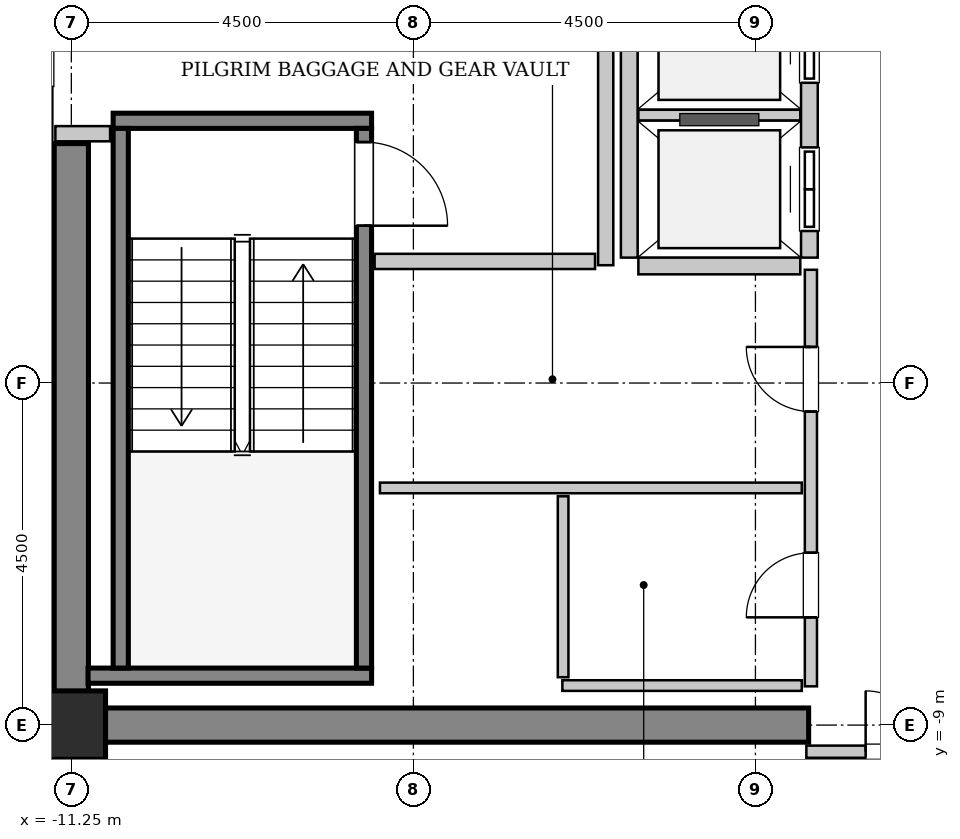
"""IFC4 building model, lengths in metres.
Left out: names, types, materials, properties, quantities, classifications, styles, units other than length and angle.
Written with IfcOpenShell. Run it as: python <this file> out.ifc"""

import sys

from ifc_helpers import new_model, si_unit, direction, frame, frame_2d, origin, origin_2d, place, context, subcontext, project, spatial, rectangle, extrude, source, transform, mapped, element, fill, save


model = new_model("IFC4")
c1 = context("Model", 3, precision=1e-05, world=origin(), true_north=direction((0.0, 1.0)))
c2 = subcontext(c1, "Body", "Model", "MODEL_VIEW")
j1 = project(units=[si_unit("LENGTHUNIT", "METRE"), si_unit("PLANEANGLEUNIT", "RADIAN")], contexts=[c1])
p1 = place(None, origin())
s1 = spatial("IfcSite", under=j1, at=p1, CompositionType="ELEMENT")
p2 = place(p1, origin())
s2 = spatial("IfcBuilding", under=s1, at=p2, CompositionType="ELEMENT")
p3 = place(p2, frame((0.0, 0.0, 302.6)))
s3 = spatial("IfcBuildingStorey", under=s2, at=p3, CompositionType="ELEMENT", Elevation=302.6)
m1 = source(origin(), c2, "Body", "SweptSolid", [
    extrude(rectangle(XDim=9.925, YDim=0.45, at=frame_2d((4.962, 0.0))), origin(), (0.0, 0.0, 1.0), 3.8),
])
p4 = place(p3, frame((-11.475, -9.0, 0.0), z_axis=(0.0, 0.0, 1.0), x_axis=(1.0, 0.0, 0.0)))
e1 = element("IfcWall", 1, at=p4, inside=s3, PredefinedType="SHEAR", context=c2, shape_type="MappedRepresentation", body=[
    mapped(m1, transform((0.0, 0.0, 0.0), x_axis=(1.0, 0.0, 0.0), y_axis=(0.0, 1.0, 0.0), z_axis=(0.0, 0.0, 1.0), scale=1.0)),
])
m2 = source(origin(), c2, "Body", "SweptSolid", [
    extrude(rectangle(XDim=7.425, YDim=0.45, at=frame_2d((3.712, 0.0))), origin(), (0.0, 0.0, 1.0), 3.8),
])
p5 = place(p3, frame((-11.25, -8.775, 0.0), z_axis=(0.0, 0.0, 1.0), x_axis=(0.0, 1.0, 0.0)))
e2 = element("IfcWall", 2, at=p5, inside=s3, PredefinedType="SHEAR", context=c2, shape_type="MappedRepresentation", body=[
    mapped(m2, transform((0.0, 0.0, 0.0), x_axis=(1.0, 0.0, 0.0), y_axis=(0.0, 1.0, 0.0), z_axis=(0.0, 0.0, 1.0), scale=1.0)),
])
m3 = source(origin(), c2, "Body", "SweptSolid", [
    extrude(rectangle(XDim=0.9, YDim=0.9, at=origin_2d()), origin(), (0.0, 0.0, 1.0), 3.8),
])
p6 = place(p3, frame((-11.25, -9.0, 0.0), z_axis=(0.0, 0.0, 1.0), x_axis=(1.0, 0.0, 0.0)))
e3 = element("IfcColumn", 3, at=p6, inside=s3, PredefinedType="COLUMN", context=c2, shape_type="MappedRepresentation", body=[
    mapped(m3, transform((0.0, 0.0, 0.0), x_axis=(1.0, 0.0, 0.0), y_axis=(0.0, 1.0, 0.0), z_axis=(0.0, 0.0, 1.0), scale=1.0)),
])
m4 = source(origin(), c2, "Body", "SweptSolid", [
    extrude(rectangle(XDim=3.4, YDim=0.2, at=frame_2d((1.7, 0.0))), origin(), (0.0, 0.0, 1.0), 3.8),
])
p7 = place(p3, frame((-10.7, -1.05, 0.0), z_axis=(0.0, 0.0, 1.0), x_axis=(1.0, 0.0, 0.0)))
e4 = element("IfcWall", 4, at=p7, inside=s3, PredefinedType="SOLIDWALL", context=c2, shape_type="MappedRepresentation", body=[
    mapped(m4, transform((0.0, 0.0, 0.0), x_axis=(1.0, 0.0, 0.0), y_axis=(0.0, 1.0, 0.0), z_axis=(0.0, 0.0, 1.0), scale=1.0)),
])
m5 = source(origin(), c2, "Body", "SweptSolid", [
    extrude(rectangle(XDim=3.73, YDim=0.2, at=frame_2d((1.865, 0.0))), origin(), (0.0, 0.0, 1.0), 3.8),
])
p8 = place(p3, frame((-11.03, -8.35, 0.0), z_axis=(0.0, 0.0, 1.0), x_axis=(1.0, 0.0, 0.0)))
e5 = element("IfcWall", 5, at=p8, inside=s3, PredefinedType="SOLIDWALL", context=c2, shape_type="MappedRepresentation", body=[
    mapped(m5, transform((0.0, 0.0, 0.0), x_axis=(1.0, 0.0, 0.0), y_axis=(0.0, 1.0, 0.0), z_axis=(0.0, 0.0, 1.0), scale=1.0)),
])
m6 = source(origin(), c2, "Body", "SweptSolid", [
    extrude(rectangle(XDim=7.1, YDim=0.2, at=frame_2d((3.55, 0.0))), origin(), (0.0, 0.0, 1.0), 3.8),
])
p9 = place(p3, frame((-10.6, -1.15, 0.0), z_axis=(0.0, 0.0, 1.0), x_axis=(0.0, -1.0, 0.0)))
e6 = element("IfcWall", 6, at=p9, inside=s3, PredefinedType="SOLIDWALL", context=c2, shape_type="MappedRepresentation", body=[
    mapped(m6, transform((0.0, 0.0, 0.0), x_axis=(1.0, 0.0, 0.0), y_axis=(0.0, 1.0, 0.0), z_axis=(0.0, 0.0, 1.0), scale=1.0)),
])
p10 = place(p3, frame((-7.4, -1.15, 0.0), z_axis=(0.0, 0.0, 1.0), x_axis=(0.0, -1.0, 0.0)))
e7 = element("IfcWall", 7, at=p10, inside=s3, PredefinedType="SOLIDWALL", context=c2, shape_type="MappedRepresentation", body=[
    mapped(m6, transform((0.0, 0.0, 0.0), x_axis=(1.0, 0.0, 0.0), y_axis=(0.0, 1.0, 0.0), z_axis=(0.0, 0.0, 1.0), scale=1.0)),
])
p11 = place(p10, frame((0.18, 0.0, 0.0)))
e8 = element("IfcOpeningElement", 8, at=p11, cuts=e7, PredefinedType="OPENING", context=c2, shape_type="SweptSolid", body=[
    extrude(rectangle(XDim=1.1, YDim=2.15, at=frame_2d((0.55, 1.075))), frame((0.0, 0.11, 0.0), z_axis=(0.0, -1.0, 0.0), x_axis=(1.0, 0.0, 0.0)), (0.0, 0.0, 1.0), 0.22),
])
m7 = source(origin(), c2, "Body", "SweptSolid", [
    extrude(rectangle(XDim=5.7, YDim=0.22, at=frame_2d((2.85, 0.0))), origin(), (0.0, 0.0, 1.0), 3.535),
])
p12 = place(p3, frame((-1.54, -2.85, 0.0), z_axis=(0.0, 0.0, 1.0), x_axis=(0.0, 1.0, 0.0)))
e9 = element("IfcWall", 9, at=p12, inside=s3, PredefinedType="SOLIDWALL", context=c2, shape_type="MappedRepresentation", body=[
    mapped(m7, transform((0.0, 0.0, 0.0), x_axis=(1.0, 0.0, 0.0), y_axis=(0.0, 1.0, 0.0), z_axis=(0.0, 0.0, 1.0), scale=1.0)),
])
p13 = place(p12, frame((0.35, 0.0, 0.0)))
e10 = element("IfcOpeningElement", 10, at=p13, cuts=e9, PredefinedType="OPENING", context=c2, shape_type="SweptSolid", body=[
    extrude(rectangle(XDim=1.1, YDim=2.2, at=frame_2d((0.55, 1.1))), frame((0.0, 0.12, 0.0), z_axis=(0.0, -1.0, 0.0), x_axis=(1.0, 0.0, 0.0)), (0.0, 0.0, 1.0), 0.24),
])
p14 = place(p12, frame((2.3, 0.0, 0.0)))
e11 = element("IfcOpeningElement", 11, at=p14, cuts=e9, PredefinedType="OPENING", context=c2, shape_type="SweptSolid", body=[
    extrude(rectangle(XDim=1.1, YDim=2.2, at=frame_2d((0.55, 1.1))), frame((0.0, 0.12, 0.0), z_axis=(0.0, -1.0, 0.0), x_axis=(1.0, 0.0, 0.0)), (0.0, 0.0, 1.0), 0.24),
])
p15 = place(p12, frame((4.25, 0.0, 0.0)))
e12 = element("IfcOpeningElement", 12, at=p15, cuts=e9, PredefinedType="OPENING", context=c2, shape_type="SweptSolid", body=[
    extrude(rectangle(XDim=1.1, YDim=2.2, at=frame_2d((0.55, 1.1))), frame((0.0, 0.12, 0.0), z_axis=(0.0, -1.0, 0.0), x_axis=(1.0, 0.0, 0.0)), (0.0, 0.0, 1.0), 0.24),
])
p16 = place(p3, frame((-3.91, 2.85, 0.0), z_axis=(0.0, 0.0, 1.0), x_axis=(0.0, -1.0, 0.0)))
e13 = element("IfcWall", 13, at=p16, inside=s3, PredefinedType="SOLIDWALL", context=c2, shape_type="MappedRepresentation", body=[
    mapped(m7, transform((0.0, 0.0, 0.0), x_axis=(1.0, 0.0, 0.0), y_axis=(0.0, 1.0, 0.0), z_axis=(0.0, 0.0, 1.0), scale=1.0)),
])
m8 = source(origin(), c2, "Body", "SweptSolid", [
    extrude(rectangle(XDim=2.13, YDim=0.22, at=frame_2d((1.065, 0.0))), origin(), (0.0, 0.0, 1.0), 3.535),
])
p17 = place(p3, frame((-3.79, -2.96, 0.0), z_axis=(0.0, 0.0, 1.0), x_axis=(1.0, 0.0, 0.0)))
e14 = element("IfcWall", 14, at=p17, inside=s3, PredefinedType="SOLIDWALL", context=c2, shape_type="MappedRepresentation", body=[
    mapped(m8, transform((0.0, 0.0, 0.0), x_axis=(1.0, 0.0, 0.0), y_axis=(0.0, 1.0, 0.0), z_axis=(0.0, 0.0, 1.0), scale=1.0)),
])
m9 = source(origin(), c2, "Body", "SweptSolid", [
    extrude(rectangle(XDim=2.13, YDim=0.14, at=frame_2d((1.065, 0.0))), origin(), (0.0, 0.0, 1.0), 3.535),
])
p18 = place(p3, frame((-3.79, -0.975, 0.0), z_axis=(0.0, 0.0, 1.0), x_axis=(1.0, 0.0, 0.0)))
e15 = element("IfcWall", 15, at=p18, inside=s3, PredefinedType="PARTITIONING", context=c2, shape_type="MappedRepresentation", body=[
    mapped(m9, transform((0.0, 0.0, 0.0), x_axis=(1.0, 0.0, 0.0), y_axis=(0.0, 1.0, 0.0), z_axis=(0.0, 0.0, 1.0), scale=1.0)),
])
m10 = source(origin(), c2, "Body", "SweptSolid", [
    extrude(rectangle(XDim=5.9, YDim=0.2, at=frame_2d((2.95, 0.0))), origin(), (0.0, 0.0, 1.0), 3.535),
])
p19 = place(p3, frame((-4.22, -2.95, 0.0), z_axis=(0.0, 0.0, 1.0), x_axis=(0.0, 1.0, 0.0)))
e16 = element("IfcWall", 16, at=p19, inside=s3, PredefinedType="PARTITIONING", context=c2, shape_type="MappedRepresentation", body=[
    mapped(m10, transform((0.0, 0.0, 0.0), x_axis=(1.0, 0.0, 0.0), y_axis=(0.0, 1.0, 0.0), z_axis=(0.0, 0.0, 1.0), scale=1.0)),
])
m11 = source(origin(), c2, "Body", "SweptSolid", [
    extrude(rectangle(XDim=2.9, YDim=0.2, at=frame_2d((1.45, 0.0))), origin(), (0.0, 0.0, 1.0), 3.535),
])
p20 = place(p3, frame((-7.26, -2.9, 0.0), z_axis=(0.0, 0.0, 1.0), x_axis=(1.0, 0.0, 0.0)))
e17 = element("IfcWall", 17, at=p20, inside=s3, PredefinedType="PARTITIONING", context=c2, shape_type="MappedRepresentation", body=[
    mapped(m11, transform((0.0, 0.0, 0.0), x_axis=(1.0, 0.0, 0.0), y_axis=(0.0, 1.0, 0.0), z_axis=(0.0, 0.0, 1.0), scale=1.0)),
])
m12 = source(origin(), c2, "Body", "SweptSolid", [
    extrude(rectangle(XDim=0.72, YDim=0.2, at=frame_2d((0.36, 0.0))), origin(), (0.0, 0.0, 1.0), 3.535),
])
p21 = place(p3, frame((-11.46, -1.22, 0.0), z_axis=(0.0, 0.0, 1.0), x_axis=(1.0, 0.0, 0.0)))
e18 = element("IfcWall", 18, at=p21, inside=s3, PredefinedType="PARTITIONING", context=c2, shape_type="MappedRepresentation", body=[
    mapped(m12, transform((0.0, 0.0, 0.0), x_axis=(1.0, 0.0, 0.0), y_axis=(0.0, 1.0, 0.0), z_axis=(0.0, 0.0, 1.0), scale=1.0)),
])
m13 = source(origin(), c2, "Body", "SweptSolid", [
    extrude(rectangle(XDim=3.16, YDim=0.16, at=frame_2d((1.58, 0.0))), origin(), (0.0, 0.0, 1.0), 2.625),
])
p22 = place(p3, frame((-1.58, -9.35, 0.0), z_axis=(0.0, 0.0, 1.0), x_axis=(1.0, 0.0, 0.0)))
e19 = element("IfcWall", 19, at=p22, inside=s3, PredefinedType="PARTITIONING", context=c2, shape_type="MappedRepresentation", body=[
    mapped(m13, transform((0.0, 0.0, 0.0), x_axis=(1.0, 0.0, 0.0), y_axis=(0.0, 1.0, 0.0), z_axis=(0.0, 0.0, 1.0), scale=1.0)),
])
p23 = place(p22, frame((0.78, 0.0, 0.0)))
e20 = element("IfcOpeningElement", 20, at=p23, cuts=e19, PredefinedType="OPENING", context=c2, shape_type="SweptSolid", body=[
    extrude(rectangle(XDim=1.6, YDim=2.3, at=frame_2d((0.8, 1.15))), frame((0.0, 0.09, 0.0), z_axis=(0.0, -1.0, 0.0), x_axis=(1.0, 0.0, 0.0)), (0.0, 0.0, 1.0), 0.18),
])
m14 = source(origin(), c2, "Body", "SweptSolid", [
    extrude(rectangle(XDim=5.48, YDim=0.16, at=frame_2d((2.74, 0.0))), origin(), (0.0, 0.0, 1.0), 3.535),
])
p24 = place(p3, frame((-1.52, -8.49, 0.0), z_axis=(0.0, 0.0, 1.0), x_axis=(0.0, 1.0, 0.0)))
e21 = element("IfcWall", 21, at=p24, inside=s3, PredefinedType="PARTITIONING", context=c2, shape_type="MappedRepresentation", body=[
    mapped(m14, transform((0.0, 0.0, 0.0), x_axis=(1.0, 0.0, 0.0), y_axis=(0.0, 1.0, 0.0), z_axis=(0.0, 0.0, 1.0), scale=1.0)),
])
p25 = place(p24, frame((0.907, 0.0, 0.0)))
e22 = element("IfcOpeningElement", 22, at=p25, cuts=e21, PredefinedType="OPENING", context=c2, shape_type="SweptSolid", body=[
    extrude(rectangle(XDim=0.85, YDim=2.1, at=frame_2d((0.425, 1.05))), frame((0.0, 0.09, 0.0), z_axis=(0.0, -1.0, 0.0), x_axis=(1.0, 0.0, 0.0)), (0.0, 0.0, 1.0), 0.18),
])
p26 = place(p24, frame((3.615, 0.0, 0.0)))
e23 = element("IfcOpeningElement", 23, at=p26, cuts=e21, PredefinedType="OPENING", context=c2, shape_type="SweptSolid", body=[
    extrude(rectangle(XDim=0.85, YDim=2.1, at=frame_2d((0.425, 1.05))), frame((0.0, 0.09, 0.0), z_axis=(0.0, -1.0, 0.0), x_axis=(1.0, 0.0, 0.0)), (0.0, 0.0, 1.0), 0.18),
])
m15 = source(origin(), c2, "Body", "SweptSolid", [
    extrude(rectangle(XDim=5.55, YDim=0.14, at=frame_2d((2.775, 0.0))), origin(), (0.0, 0.0, 1.0), 3.535),
])
p27 = place(p3, frame((-7.19, -5.88, 0.0), z_axis=(0.0, 0.0, 1.0), x_axis=(1.0, 0.0, 0.0)))
e24 = element("IfcWall", 24, at=p27, inside=s3, PredefinedType="PARTITIONING", context=c2, shape_type="MappedRepresentation", body=[
    mapped(m15, transform((0.0, 0.0, 0.0), x_axis=(1.0, 0.0, 0.0), y_axis=(0.0, 1.0, 0.0), z_axis=(0.0, 0.0, 1.0), scale=1.0)),
])
m16 = source(origin(), c2, "Body", "SweptSolid", [
    extrude(rectangle(XDim=3.15, YDim=0.14, at=frame_2d((1.575, 0.0))), origin(), (0.0, 0.0, 1.0), 3.535),
])
p28 = place(p3, frame((-4.79, -8.48, 0.0), z_axis=(0.0, 0.0, 1.0), x_axis=(1.0, 0.0, 0.0)))
e25 = element("IfcWall", 25, at=p28, inside=s3, PredefinedType="PARTITIONING", context=c2, shape_type="MappedRepresentation", body=[
    mapped(m16, transform((0.0, 0.0, 0.0), x_axis=(1.0, 0.0, 0.0), y_axis=(0.0, 1.0, 0.0), z_axis=(0.0, 0.0, 1.0), scale=1.0)),
])
m17 = source(origin(), c2, "Body", "SweptSolid", [
    extrude(rectangle(XDim=2.38, YDim=0.14, at=frame_2d((1.19, 0.0))), origin(), (0.0, 0.0, 1.0), 3.535),
])
p29 = place(p3, frame((-4.78, -8.37, 0.0), z_axis=(0.0, 0.0, 1.0), x_axis=(0.0, 1.0, 0.0)))
e26 = element("IfcWall", 26, at=p29, inside=s3, PredefinedType="PARTITIONING", context=c2, shape_type="MappedRepresentation", body=[
    mapped(m17, transform((0.0, 0.0, 0.0), x_axis=(1.0, 0.0, 0.0), y_axis=(0.0, 1.0, 0.0), z_axis=(0.0, 0.0, 1.0), scale=1.0)),
])
m18 = source(origin(), c2, "Body", "SweptSolid", [
    extrude(rectangle(XDim=1.1, YDim=2.15, at=frame_2d((0.55, 1.075))), frame((0.0, 0.025, 0.0), z_axis=(0.0, -1.0, 0.0), x_axis=(1.0, 0.0, 0.0)), (0.0, 0.0, 1.0), 0.05),
])
p30 = place(p11, origin())
e27 = element("IfcDoor", 27, at=p30, inside=s3, OperationType="SINGLE_SWING_RIGHT", PredefinedType="DOOR", context=c2, shape_type="MappedRepresentation", body=[
    mapped(m18, transform((0.0, 0.0, 0.0), x_axis=(1.0, 0.0, 0.0), y_axis=(0.0, 1.0, 0.0), z_axis=(0.0, 0.0, 1.0), scale=1.0)),
])
fill(e8, e27)
m19 = source(origin(), c2, "Body", "SweptSolid", [
    extrude(rectangle(XDim=1.1, YDim=2.2, at=frame_2d((0.55, 1.1))), frame((0.0, 0.025, 0.0), z_axis=(0.0, -1.0, 0.0), x_axis=(1.0, 0.0, 0.0)), (0.0, 0.0, 1.0), 0.05),
])
p31 = place(p13, origin())
e28 = element("IfcDoor", 28, at=p31, inside=s3, OperationType="DOUBLE_DOOR_SLIDING", PredefinedType="DOOR", context=c2, shape_type="MappedRepresentation", body=[
    mapped(m19, transform((0.0, 0.0, 0.0), x_axis=(1.0, 0.0, 0.0), y_axis=(0.0, 1.0, 0.0), z_axis=(0.0, 0.0, 1.0), scale=1.0)),
])
fill(e10, e28)
p32 = place(p14, origin())
e29 = element("IfcDoor", 29, at=p32, inside=s3, OperationType="DOUBLE_DOOR_SLIDING", PredefinedType="DOOR", context=c2, shape_type="MappedRepresentation", body=[
    mapped(m19, transform((0.0, 0.0, 0.0), x_axis=(1.0, 0.0, 0.0), y_axis=(0.0, 1.0, 0.0), z_axis=(0.0, 0.0, 1.0), scale=1.0)),
])
fill(e11, e29)
m20 = source(origin(), c2, "Body", "SweptSolid", [
    extrude(rectangle(XDim=1.6, YDim=2.3, at=frame_2d((0.8, 1.15))), frame((0.0, 0.025, 0.0), z_axis=(0.0, -1.0, 0.0), x_axis=(1.0, 0.0, 0.0)), (0.0, 0.0, 1.0), 0.05),
])
p33 = place(p23, origin())
e30 = element("IfcDoor", 30, at=p33, inside=s3, OperationType="DOUBLE_DOOR_SINGLE_SWING", PredefinedType="DOOR", context=c2, shape_type="MappedRepresentation", body=[
    mapped(m20, transform((0.0, 0.0, 0.0), x_axis=(1.0, 0.0, 0.0), y_axis=(0.0, 1.0, 0.0), z_axis=(0.0, 0.0, 1.0), scale=1.0)),
])
fill(e20, e30)
m21 = source(origin(), c2, "Body", "SweptSolid", [
    extrude(rectangle(XDim=0.85, YDim=2.1, at=frame_2d((0.425, 1.05))), frame((0.0, 0.025, 0.0), z_axis=(0.0, -1.0, 0.0), x_axis=(1.0, 0.0, 0.0)), (0.0, 0.0, 1.0), 0.05),
])
p34 = place(p25, origin())
e31 = element("IfcDoor", 31, at=p34, inside=s3, OperationType="SINGLE_SWING_LEFT", PredefinedType="DOOR", context=c2, shape_type="MappedRepresentation", body=[
    mapped(m21, transform((0.0, 0.0, 0.0), x_axis=(1.0, 0.0, 0.0), y_axis=(0.0, 1.0, 0.0), z_axis=(0.0, 0.0, 1.0), scale=1.0)),
])
fill(e22, e31)
p35 = place(p26, origin())
e32 = element("IfcDoor", 32, at=p35, inside=s3, OperationType="SINGLE_SWING_RIGHT", PredefinedType="DOOR", context=c2, shape_type="MappedRepresentation", body=[
    mapped(m21, transform((0.0, 0.0, 0.0), x_axis=(1.0, 0.0, 0.0), y_axis=(0.0, 1.0, 0.0), z_axis=(0.0, 0.0, 1.0), scale=1.0)),
])
fill(e23, e32)
save(model, sys.argv[1])
